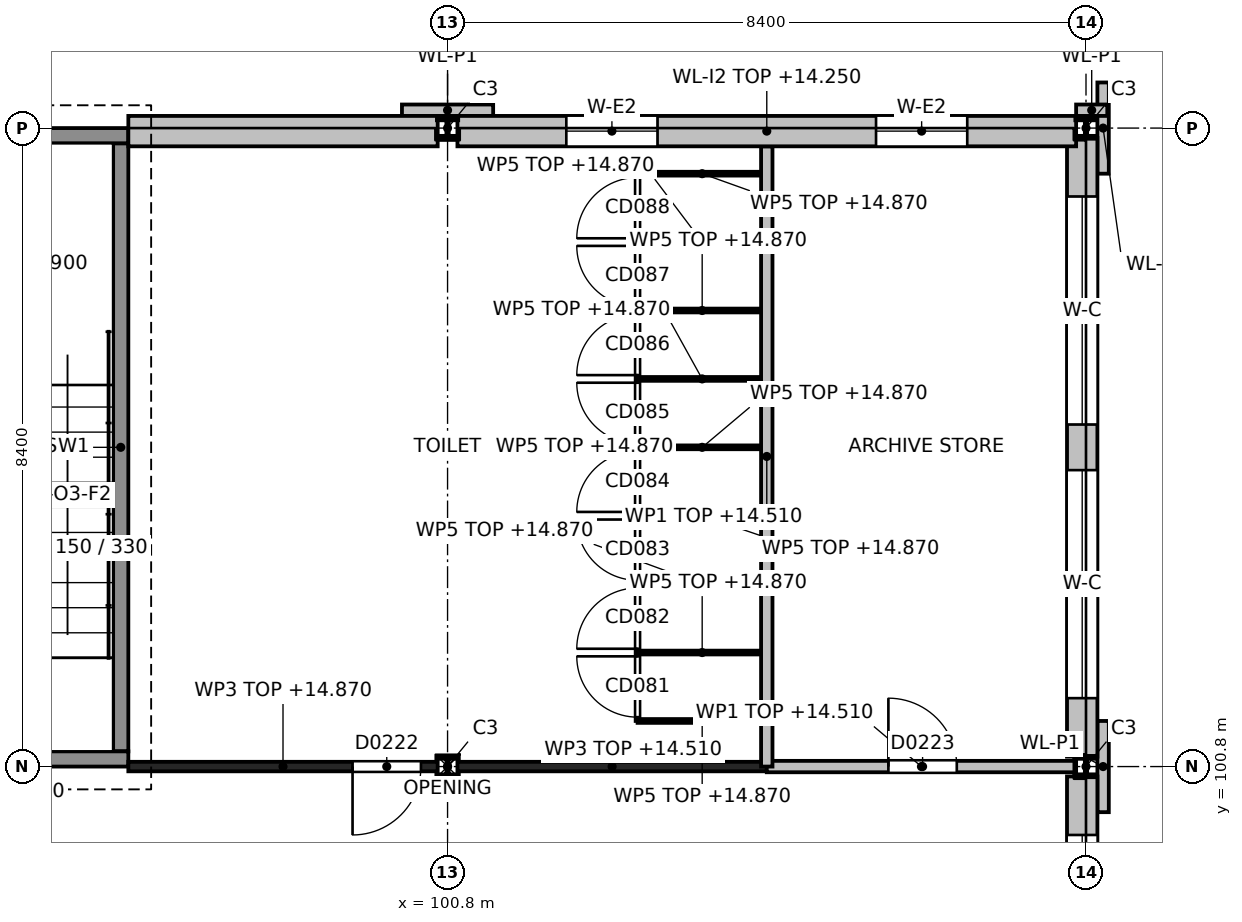
"""IFC4 building model, lengths in metres.
Left out: names, types, materials, properties, quantities, classifications, styles, units other than length and angle.
Written with IfcOpenShell. Run it as: python <this file> out.ifc"""

import sys

from ifc_helpers import new_model, si_unit, direction, frame, frame_2d, origin, origin_2d, place, context, subcontext, project, spatial, rectangle, i_section, extrude, element, fill, save


model = new_model("IFC4")
c1 = context("Model", 3, precision=1e-05, world=origin(), true_north=direction((0.0, 1.0)))
c2 = subcontext(c1, "Body", "Model", "MODEL_VIEW")
j1 = project(units=[si_unit("LENGTHUNIT", "METRE"), si_unit("PLANEANGLEUNIT", "RADIAN")], contexts=[c1])
p1 = place(None, origin())
s1 = spatial("IfcSite", under=j1, at=p1, CompositionType="ELEMENT")
p2 = place(p1, origin())
s2 = spatial("IfcBuilding", under=s1, at=p2, CompositionType="ELEMENT")
p3 = place(p2, frame((0.0, 0.0, 10.8)))
s3 = spatial("IfcBuildingStorey", under=s2, at=p3, CompositionType="ELEMENT", Elevation=10.8)
for number, where, z_axis, x_axis in (
    (1, (100.8, 100.8, 0.0), (0.0, 0.0, 1.0), (1.0, 0.0, 0.0)),
    (2, (100.8, 109.2, 0.0), (0.0, 0.0, 1.0), (1.0, 0.0, 0.0)),
    (3, (109.2, 100.8, 0.0), (0.0, 0.0, 1.0), (1.0, 0.0, 0.0)),
    (4, (109.2, 109.2, 0.0), (0.0, 0.0, 1.0), (1.0, 0.0, 0.0)),
):
    element("IfcColumn", number, at=place(p3, frame(where, z_axis=z_axis, x_axis=x_axis)), inside=s3, PredefinedType="COLUMN", context=c2, shape_type="SweptSolid", body=[
        extrude(i_section(OverallWidth=0.26, OverallDepth=0.26, WebThickness=0.01, FlangeThickness=0.018, at=origin_2d()), origin(), (0.0, 0.0, 1.0), 4.2),
    ])
p4 = place(p3, frame((92.4, 100.9, 0.0), z_axis=(0.0, 0.0, 1.0), x_axis=(1.0, 0.0, 0.0)))
e5 = element("IfcWall", 5, at=p4, inside=s3, PredefinedType="SHEAR", context=c2, shape_type="SweptSolid", body=[
    extrude(rectangle(XDim=4.2, YDim=0.2, at=frame_2d((2.1, 0.0))), origin(), (0.0, 0.0, 1.0), 4.2),
])
p5 = place(p4, frame((1.6, 0.0, 0.0)))
e6 = element("IfcOpeningElement", 6, at=p5, cuts=e5, PredefinedType="OPENING", context=c2, shape_type="SweptSolid", body=[
    extrude(rectangle(XDim=1.1, YDim=2.1, at=frame_2d((0.55, 1.05))), frame((0.0, 0.1, 0.0), z_axis=(0.0, -1.0, 0.0), x_axis=(1.0, 0.0, 0.0)), (0.0, 0.0, 1.0), 0.2),
])
p6 = place(p3, frame((92.4, 109.1, 0.0), z_axis=(0.0, 0.0, 1.0), x_axis=(1.0, 0.0, 0.0)))
e7 = element("IfcWall", 7, at=p6, inside=s3, PredefinedType="SHEAR", context=c2, shape_type="SweptSolid", body=[
    extrude(rectangle(XDim=4.2, YDim=0.2, at=frame_2d((2.1, 0.0))), origin(), (0.0, 0.0, 1.0), 4.2),
])
p7 = place(p3, frame((96.5, 101.0, 0.0), z_axis=(0.0, 0.0, 1.0), x_axis=(0.0, 1.0, 0.0)))
e8 = element("IfcWall", 8, at=p7, inside=s3, PredefinedType="SHEAR", context=c2, shape_type="SweptSolid", body=[
    extrude(rectangle(XDim=8.0, YDim=0.2, at=frame_2d((4.0, 0.0))), origin(), (0.0, 0.0, 1.0), 4.2),
])
p8 = place(p3, frame((96.6, 109.16, 0.0), z_axis=(0.0, 0.0, 1.0), x_axis=(1.0, 0.0, 0.0)))
e9 = element("IfcWall", 9, at=p8, inside=s3, PredefinedType="SOLIDWALL", context=c2, shape_type="SweptSolid", body=[
    extrude(rectangle(XDim=4.07, YDim=0.4, at=frame_2d((2.035, 0.0))), origin(), (0.0, 0.0, 1.0), 3.45),
])
p9 = place(p3, frame((100.93, 109.16, 0.0), z_axis=(0.0, 0.0, 1.0), x_axis=(1.0, 0.0, 0.0)))
e10 = element("IfcWall", 10, at=p9, inside=s3, PredefinedType="SOLIDWALL", context=c2, shape_type="SweptSolid", body=[
    extrude(rectangle(XDim=8.14, YDim=0.4, at=frame_2d((4.07, 0.0))), origin(), (0.0, 0.0, 1.0), 3.45),
])
p10 = place(p9, frame((1.433, 0.0, 0.9)))
e11 = element("IfcOpeningElement", 11, at=p10, cuts=e10, PredefinedType="OPENING", context=c2, shape_type="SweptSolid", body=[
    extrude(rectangle(XDim=1.2, YDim=2.4, at=frame_2d((0.6, 1.2))), frame((0.0, 0.2, 0.0), z_axis=(0.0, -1.0, 0.0), x_axis=(1.0, 0.0, 0.0)), (0.0, 0.0, 1.0), 0.4),
])
p11 = place(p9, frame((5.508, 0.0, 0.9)))
e12 = element("IfcOpeningElement", 12, at=p11, cuts=e10, PredefinedType="OPENING", context=c2, shape_type="SweptSolid", body=[
    extrude(rectangle(XDim=1.2, YDim=2.4, at=frame_2d((0.6, 1.2))), frame((0.0, 0.2, 0.0), z_axis=(0.0, -1.0, 0.0), x_axis=(1.0, 0.0, 0.0)), (0.0, 0.0, 1.0), 0.4),
])
p12 = place(p3, frame((100.2, 109.435, 0.0), z_axis=(0.0, 0.0, 1.0), x_axis=(1.0, 0.0, 0.0)))
e13 = element("IfcWall", 13, at=p12, inside=s3, PredefinedType="SOLIDWALL", context=c2, shape_type="SweptSolid", body=[
    extrude(rectangle(XDim=1.2, YDim=0.15, at=frame_2d((0.6, 0.0))), origin(), (0.0, 0.0, 1.0), 4.2),
])
p13 = place(p3, frame((109.07, 109.435, 0.0), z_axis=(0.0, 0.0, 1.0), x_axis=(1.0, 0.0, 0.0)))
e14 = element("IfcWall", 14, at=p13, inside=s3, PredefinedType="SOLIDWALL", context=c2, shape_type="SweptSolid", body=[
    extrude(rectangle(XDim=0.41, YDim=0.15, at=frame_2d((0.205, 0.0))), origin(), (0.0, 0.0, 1.0), 4.2),
])
p14 = place(p3, frame((109.15, 92.53, 0.0), z_axis=(0.0, 0.0, 1.0), x_axis=(0.0, 1.0, 0.0)))
e15 = element("IfcWall", 15, at=p14, inside=s3, PredefinedType="SOLIDWALL", context=c2, shape_type="SweptSolid", body=[
    extrude(rectangle(XDim=8.14, YDim=0.4, at=frame_2d((4.07, 0.0))), origin(), (0.0, 0.0, 1.0), 3.45),
])
p15 = place(p14, frame((0.77, 0.0, 0.9)))
e16 = element("IfcOpeningElement", 16, at=p15, cuts=e15, PredefinedType="OPENING", context=c2, shape_type="SweptSolid", body=[
    extrude(rectangle(XDim=3.0, YDim=2.4, at=frame_2d((1.5, 1.2))), frame((0.0, 0.2, 0.0), z_axis=(0.0, -1.0, 0.0), x_axis=(1.0, 0.0, 0.0)), (0.0, 0.0, 1.0), 0.4),
])
p16 = place(p14, frame((4.37, 0.0, 0.9)))
e17 = element("IfcOpeningElement", 17, at=p16, cuts=e15, PredefinedType="OPENING", context=c2, shape_type="SweptSolid", body=[
    extrude(rectangle(XDim=3.0, YDim=2.4, at=frame_2d((1.5, 1.2))), frame((0.0, 0.2, 0.0), z_axis=(0.0, -1.0, 0.0), x_axis=(1.0, 0.0, 0.0)), (0.0, 0.0, 1.0), 0.4),
])
p17 = place(p3, frame((109.15, 100.93, 0.0), z_axis=(0.0, 0.0, 1.0), x_axis=(0.0, 1.0, 0.0)))
e18 = element("IfcWall", 18, at=p17, inside=s3, PredefinedType="SOLIDWALL", context=c2, shape_type="SweptSolid", body=[
    extrude(rectangle(XDim=8.14, YDim=0.4, at=frame_2d((4.07, 0.0))), origin(), (0.0, 0.0, 1.0), 3.45),
])
p18 = place(p17, frame((0.77, 0.0, 0.9)))
e19 = element("IfcOpeningElement", 19, at=p18, cuts=e18, PredefinedType="OPENING", context=c2, shape_type="SweptSolid", body=[
    extrude(rectangle(XDim=3.0, YDim=2.4, at=frame_2d((1.5, 1.2))), frame((0.0, 0.2, 0.0), z_axis=(0.0, -1.0, 0.0), x_axis=(1.0, 0.0, 0.0)), (0.0, 0.0, 1.0), 0.4),
])
p19 = place(p17, frame((4.37, 0.0, 0.9)))
e20 = element("IfcOpeningElement", 20, at=p19, cuts=e18, PredefinedType="OPENING", context=c2, shape_type="SweptSolid", body=[
    extrude(rectangle(XDim=3.0, YDim=2.4, at=frame_2d((1.5, 1.2))), frame((0.0, 0.2, 0.0), z_axis=(0.0, -1.0, 0.0), x_axis=(1.0, 0.0, 0.0)), (0.0, 0.0, 1.0), 0.4),
])
for number, where, z_axis, x_axis in (
    (21, (109.425, 100.2, 0.0), (0.0, 0.0, 1.0), (0.0, 1.0, 0.0)),
    (22, (109.425, 108.6, 0.0), (0.0, 0.0, 1.0), (0.0, 1.0, 0.0)),
):
    element("IfcWall", number, at=place(p3, frame(where, z_axis=z_axis, x_axis=x_axis)), inside=s3, PredefinedType="SOLIDWALL", context=c2, shape_type="SweptSolid", body=[
        extrude(rectangle(XDim=1.2, YDim=0.15, at=frame_2d((0.6, 0.0))), origin(), (0.0, 0.0, 1.0), 4.2),
    ])
p20 = place(p3, frame((96.6, 100.8, 0.0), z_axis=(0.0, 0.0, 1.0), x_axis=(1.0, 0.0, 0.0)))
e23 = element("IfcWall", 23, at=p20, inside=s3, PredefinedType="PARTITIONING", context=c2, shape_type="SweptSolid", body=[
    extrude(rectangle(XDim=4.07, YDim=0.125, at=frame_2d((2.035, 0.0))), origin(), (0.0, 0.0, 1.0), 4.07),
])
p21 = place(p20, frame((2.95, 0.0, 0.0)))
e24 = element("IfcOpeningElement", 24, at=p21, cuts=e23, PredefinedType="OPENING", context=c2, shape_type="SweptSolid", body=[
    extrude(rectangle(XDim=0.9, YDim=2.1, at=frame_2d((0.45, 1.05))), frame((0.0, 0.062, 0.0), z_axis=(0.0, -1.0, 0.0), x_axis=(1.0, 0.0, 0.0)), (0.0, 0.0, 1.0), 0.125),
])
p22 = place(p3, frame((100.93, 100.8, 0.0), z_axis=(0.0, 0.0, 1.0), x_axis=(1.0, 0.0, 0.0)))
e25 = element("IfcWall", 25, at=p22, inside=s3, PredefinedType="PARTITIONING", context=c2, shape_type="SweptSolid", body=[
    extrude(rectangle(XDim=4.07, YDim=0.125, at=frame_2d((2.035, 0.0))), origin(), (0.0, 0.0, 1.0), 3.71),
])
p23 = place(p3, frame((105.0, 100.8, 0.0), z_axis=(0.0, 0.0, 1.0), x_axis=(1.0, 0.0, 0.0)))
e26 = element("IfcWall", 26, at=p23, inside=s3, PredefinedType="PARTITIONING", context=c2, shape_type="SweptSolid", body=[
    extrude(rectangle(XDim=4.07, YDim=0.15, at=frame_2d((2.035, 0.0))), origin(), (0.0, 0.0, 1.0), 3.71),
])
p24 = place(p23, frame((1.6, 0.0, 0.0)))
e27 = element("IfcOpeningElement", 27, at=p24, cuts=e26, PredefinedType="OPENING", context=c2, shape_type="SweptSolid", body=[
    extrude(rectangle(XDim=0.9, YDim=2.1, at=frame_2d((0.45, 1.05))), frame((0.0, 0.075, 0.0), z_axis=(0.0, -1.0, 0.0), x_axis=(1.0, 0.0, 0.0)), (0.0, 0.0, 1.0), 0.15),
])
p25 = place(p3, frame((105.0, 100.8, 0.0), z_axis=(0.0, 0.0, 1.0), x_axis=(0.0, 1.0, 0.0)))
e28 = element("IfcWall", 28, at=p25, inside=s3, PredefinedType="PARTITIONING", context=c2, shape_type="SweptSolid", body=[
    extrude(rectangle(XDim=8.159, YDim=0.15, at=frame_2d((4.08, 0.0))), origin(), (0.0, 0.0, 1.0), 3.71),
])
p26 = place(p3, frame((103.3, 101.4, 0.0), z_axis=(0.0, 0.0, 1.0), x_axis=(0.0, 1.0, 0.0)))
e29 = element("IfcWall", 29, at=p26, inside=s3, PredefinedType="PARTITIONING", context=c2, shape_type="SweptSolid", body=[
    extrude(rectangle(XDim=7.2, YDim=0.05, at=frame_2d((3.6, 0.0))), origin(), (0.0, 0.0, 1.0), 4.07),
])
p27 = place(p26, frame((0.05, 0.0, 0.0)))
e30 = element("IfcOpeningElement", 30, at=p27, cuts=e29, PredefinedType="OPENING", context=c2, shape_type="SweptSolid", body=[
    extrude(rectangle(XDim=0.8, YDim=2.0, at=frame_2d((0.4, 1.0))), frame((0.0, 0.025, 0.0), z_axis=(0.0, -1.0, 0.0), x_axis=(1.0, 0.0, 0.0)), (0.0, 0.0, 1.0), 0.05),
])
p28 = place(p26, frame((0.95, 0.0, 0.0)))
e31 = element("IfcOpeningElement", 31, at=p28, cuts=e29, PredefinedType="OPENING", context=c2, shape_type="SweptSolid", body=[
    extrude(rectangle(XDim=0.8, YDim=2.0, at=frame_2d((0.4, 1.0))), frame((0.0, 0.025, 0.0), z_axis=(0.0, -1.0, 0.0), x_axis=(1.0, 0.0, 0.0)), (0.0, 0.0, 1.0), 0.05),
])
p29 = place(p26, frame((1.85, 0.0, 0.0)))
e32 = element("IfcOpeningElement", 32, at=p29, cuts=e29, PredefinedType="OPENING", context=c2, shape_type="SweptSolid", body=[
    extrude(rectangle(XDim=0.8, YDim=2.0, at=frame_2d((0.4, 1.0))), frame((0.0, 0.025, 0.0), z_axis=(0.0, -1.0, 0.0), x_axis=(1.0, 0.0, 0.0)), (0.0, 0.0, 1.0), 0.05),
])
p30 = place(p26, frame((2.75, 0.0, 0.0)))
e33 = element("IfcOpeningElement", 33, at=p30, cuts=e29, PredefinedType="OPENING", context=c2, shape_type="SweptSolid", body=[
    extrude(rectangle(XDim=0.8, YDim=2.0, at=frame_2d((0.4, 1.0))), frame((0.0, 0.025, 0.0), z_axis=(0.0, -1.0, 0.0), x_axis=(1.0, 0.0, 0.0)), (0.0, 0.0, 1.0), 0.05),
])
p31 = place(p26, frame((3.65, 0.0, 0.0)))
e34 = element("IfcOpeningElement", 34, at=p31, cuts=e29, PredefinedType="OPENING", context=c2, shape_type="SweptSolid", body=[
    extrude(rectangle(XDim=0.8, YDim=2.0, at=frame_2d((0.4, 1.0))), frame((0.0, 0.025, 0.0), z_axis=(0.0, -1.0, 0.0), x_axis=(1.0, 0.0, 0.0)), (0.0, 0.0, 1.0), 0.05),
])
p32 = place(p26, frame((4.55, 0.0, 0.0)))
e35 = element("IfcOpeningElement", 35, at=p32, cuts=e29, PredefinedType="OPENING", context=c2, shape_type="SweptSolid", body=[
    extrude(rectangle(XDim=0.8, YDim=2.0, at=frame_2d((0.4, 1.0))), frame((0.0, 0.025, 0.0), z_axis=(0.0, -1.0, 0.0), x_axis=(1.0, 0.0, 0.0)), (0.0, 0.0, 1.0), 0.05),
])
p33 = place(p26, frame((5.45, 0.0, 0.0)))
e36 = element("IfcOpeningElement", 36, at=p33, cuts=e29, PredefinedType="OPENING", context=c2, shape_type="SweptSolid", body=[
    extrude(rectangle(XDim=0.8, YDim=2.0, at=frame_2d((0.4, 1.0))), frame((0.0, 0.025, 0.0), z_axis=(0.0, -1.0, 0.0), x_axis=(1.0, 0.0, 0.0)), (0.0, 0.0, 1.0), 0.05),
])
p34 = place(p26, frame((6.35, 0.0, 0.0)))
e37 = element("IfcOpeningElement", 37, at=p34, cuts=e29, PredefinedType="OPENING", context=c2, shape_type="SweptSolid", body=[
    extrude(rectangle(XDim=0.8, YDim=2.0, at=frame_2d((0.4, 1.0))), frame((0.0, 0.025, 0.0), z_axis=(0.0, -1.0, 0.0), x_axis=(1.0, 0.0, 0.0)), (0.0, 0.0, 1.0), 0.05),
])
for number, where, z_axis, x_axis in (
    (38, (105.0, 101.4, 0.0), (0.0, 0.0, 1.0), (-1.0, 0.0, 0.0)),
    (39, (105.0, 102.3, 0.0), (0.0, 0.0, 1.0), (-1.0, 0.0, 0.0)),
    (40, (105.0, 103.2, 0.0), (0.0, 0.0, 1.0), (-1.0, 0.0, 0.0)),
    (41, (105.0, 104.1, 0.0), (0.0, 0.0, 1.0), (-1.0, 0.0, 0.0)),
    (42, (105.0, 105.0, 0.0), (0.0, 0.0, 1.0), (-1.0, 0.0, 0.0)),
    (43, (105.0, 105.9, 0.0), (0.0, 0.0, 1.0), (-1.0, 0.0, 0.0)),
    (44, (105.0, 106.8, 0.0), (0.0, 0.0, 1.0), (-1.0, 0.0, 0.0)),
    (45, (105.0, 107.7, 0.0), (0.0, 0.0, 1.0), (-1.0, 0.0, 0.0)),
    (46, (105.0, 108.6, 0.0), (0.0, 0.0, 1.0), (-1.0, 0.0, 0.0)),
):
    element("IfcWall", number, at=place(p3, frame(where, z_axis=z_axis, x_axis=x_axis)), inside=s3, PredefinedType="PARTITIONING", context=c2, shape_type="SweptSolid", body=[
        extrude(rectangle(XDim=1.7, YDim=0.05, at=frame_2d((0.85, 0.0))), origin(), (0.0, 0.0, 1.0), 4.07),
    ])
p35 = place(p10, origin())
e47 = element("IfcWindow", 47, at=p35, inside=s3, PartitioningType="SINGLE_PANEL", PredefinedType="WINDOW", context=c2, shape_type="SweptSolid", body=[
    extrude(rectangle(XDim=1.2, YDim=2.4, at=frame_2d((0.6, 1.2))), frame((0.0, 0.03, 0.0), z_axis=(0.0, -1.0, 0.0), x_axis=(1.0, 0.0, 0.0)), (0.0, 0.0, 1.0), 0.06),
])
fill(e11, e47)
p36 = place(p11, origin())
e48 = element("IfcWindow", 48, at=p36, inside=s3, PartitioningType="SINGLE_PANEL", PredefinedType="WINDOW", context=c2, shape_type="SweptSolid", body=[
    extrude(rectangle(XDim=1.2, YDim=2.4, at=frame_2d((0.6, 1.2))), frame((0.0, 0.03, 0.0), z_axis=(0.0, -1.0, 0.0), x_axis=(1.0, 0.0, 0.0)), (0.0, 0.0, 1.0), 0.06),
])
fill(e12, e48)
p37 = place(p16, origin())
e49 = element("IfcWindow", 49, at=p37, inside=s3, PartitioningType="SINGLE_PANEL", PredefinedType="WINDOW", context=c2, shape_type="SweptSolid", body=[
    extrude(rectangle(XDim=3.0, YDim=2.4, at=frame_2d((1.5, 1.2))), frame((0.0, 0.03, 0.0), z_axis=(0.0, -1.0, 0.0), x_axis=(1.0, 0.0, 0.0)), (0.0, 0.0, 1.0), 0.06),
])
fill(e17, e49)
p38 = place(p18, origin())
e50 = element("IfcWindow", 50, at=p38, inside=s3, PartitioningType="SINGLE_PANEL", PredefinedType="WINDOW", context=c2, shape_type="SweptSolid", body=[
    extrude(rectangle(XDim=3.0, YDim=2.4, at=frame_2d((1.5, 1.2))), frame((0.0, 0.03, 0.0), z_axis=(0.0, -1.0, 0.0), x_axis=(1.0, 0.0, 0.0)), (0.0, 0.0, 1.0), 0.06),
])
fill(e19, e50)
p39 = place(p19, origin())
e51 = element("IfcWindow", 51, at=p39, inside=s3, PartitioningType="SINGLE_PANEL", PredefinedType="WINDOW", context=c2, shape_type="SweptSolid", body=[
    extrude(rectangle(XDim=3.0, YDim=2.4, at=frame_2d((1.5, 1.2))), frame((0.0, 0.03, 0.0), z_axis=(0.0, -1.0, 0.0), x_axis=(1.0, 0.0, 0.0)), (0.0, 0.0, 1.0), 0.06),
])
fill(e20, e51)
p40 = place(p21, origin())
e52 = element("IfcDoor", 52, at=p40, inside=s3, OperationType="SINGLE_SWING_LEFT", PredefinedType="DOOR", context=c2, shape_type="SweptSolid", body=[
    extrude(rectangle(XDim=0.9, YDim=2.1, at=frame_2d((0.45, 1.05))), frame((0.0, 0.025, 0.0), z_axis=(0.0, -1.0, 0.0), x_axis=(1.0, 0.0, 0.0)), (0.0, 0.0, 1.0), 0.05),
])
fill(e24, e52)
p41 = place(p24, origin())
e53 = element("IfcDoor", 53, at=p41, inside=s3, OperationType="SINGLE_SWING_LEFT", PredefinedType="DOOR", context=c2, shape_type="SweptSolid", body=[
    extrude(rectangle(XDim=0.9, YDim=2.1, at=frame_2d((0.45, 1.05))), frame((0.0, 0.025, 0.0), z_axis=(0.0, -1.0, 0.0), x_axis=(1.0, 0.0, 0.0)), (0.0, 0.0, 1.0), 0.05),
])
fill(e27, e53)
p42 = place(p27, origin())
e54 = element("IfcDoor", 54, at=p42, inside=s3, OperationType="SINGLE_SWING_RIGHT", PredefinedType="DOOR", context=c2, shape_type="SweptSolid", body=[
    extrude(rectangle(XDim=0.8, YDim=2.0, at=frame_2d((0.4, 1.0))), frame((0.0, 0.025, 0.0), z_axis=(0.0, -1.0, 0.0), x_axis=(1.0, 0.0, 0.0)), (0.0, 0.0, 1.0), 0.05),
])
fill(e30, e54)
p43 = place(p28, origin())
e55 = element("IfcDoor", 55, at=p43, inside=s3, OperationType="SINGLE_SWING_LEFT", PredefinedType="DOOR", context=c2, shape_type="SweptSolid", body=[
    extrude(rectangle(XDim=0.8, YDim=2.0, at=frame_2d((0.4, 1.0))), frame((0.0, 0.025, 0.0), z_axis=(0.0, -1.0, 0.0), x_axis=(1.0, 0.0, 0.0)), (0.0, 0.0, 1.0), 0.05),
])
fill(e31, e55)
p44 = place(p29, origin())
e56 = element("IfcDoor", 56, at=p44, inside=s3, OperationType="SINGLE_SWING_RIGHT", PredefinedType="DOOR", context=c2, shape_type="SweptSolid", body=[
    extrude(rectangle(XDim=0.8, YDim=2.0, at=frame_2d((0.4, 1.0))), frame((0.0, 0.025, 0.0), z_axis=(0.0, -1.0, 0.0), x_axis=(1.0, 0.0, 0.0)), (0.0, 0.0, 1.0), 0.05),
])
fill(e32, e56)
p45 = place(p30, origin())
e57 = element("IfcDoor", 57, at=p45, inside=s3, OperationType="SINGLE_SWING_LEFT", PredefinedType="DOOR", context=c2, shape_type="SweptSolid", body=[
    extrude(rectangle(XDim=0.8, YDim=2.0, at=frame_2d((0.4, 1.0))), frame((0.0, 0.025, 0.0), z_axis=(0.0, -1.0, 0.0), x_axis=(1.0, 0.0, 0.0)), (0.0, 0.0, 1.0), 0.05),
])
fill(e33, e57)
p46 = place(p31, origin())
e58 = element("IfcDoor", 58, at=p46, inside=s3, OperationType="SINGLE_SWING_RIGHT", PredefinedType="DOOR", context=c2, shape_type="SweptSolid", body=[
    extrude(rectangle(XDim=0.8, YDim=2.0, at=frame_2d((0.4, 1.0))), frame((0.0, 0.025, 0.0), z_axis=(0.0, -1.0, 0.0), x_axis=(1.0, 0.0, 0.0)), (0.0, 0.0, 1.0), 0.05),
])
fill(e34, e58)
p47 = place(p32, origin())
e59 = element("IfcDoor", 59, at=p47, inside=s3, OperationType="SINGLE_SWING_LEFT", PredefinedType="DOOR", context=c2, shape_type="SweptSolid", body=[
    extrude(rectangle(XDim=0.8, YDim=2.0, at=frame_2d((0.4, 1.0))), frame((0.0, 0.025, 0.0), z_axis=(0.0, -1.0, 0.0), x_axis=(1.0, 0.0, 0.0)), (0.0, 0.0, 1.0), 0.05),
])
fill(e35, e59)
p48 = place(p33, origin())
e60 = element("IfcDoor", 60, at=p48, inside=s3, OperationType="SINGLE_SWING_RIGHT", PredefinedType="DOOR", context=c2, shape_type="SweptSolid", body=[
    extrude(rectangle(XDim=0.8, YDim=2.0, at=frame_2d((0.4, 1.0))), frame((0.0, 0.025, 0.0), z_axis=(0.0, -1.0, 0.0), x_axis=(1.0, 0.0, 0.0)), (0.0, 0.0, 1.0), 0.05),
])
fill(e36, e60)
p49 = place(p34, origin())
e61 = element("IfcDoor", 61, at=p49, inside=s3, OperationType="SINGLE_SWING_LEFT", PredefinedType="DOOR", context=c2, shape_type="SweptSolid", body=[
    extrude(rectangle(XDim=0.8, YDim=2.0, at=frame_2d((0.4, 1.0))), frame((0.0, 0.025, 0.0), z_axis=(0.0, -1.0, 0.0), x_axis=(1.0, 0.0, 0.0)), (0.0, 0.0, 1.0), 0.05),
])
fill(e37, e61)
save(model, sys.argv[1])
